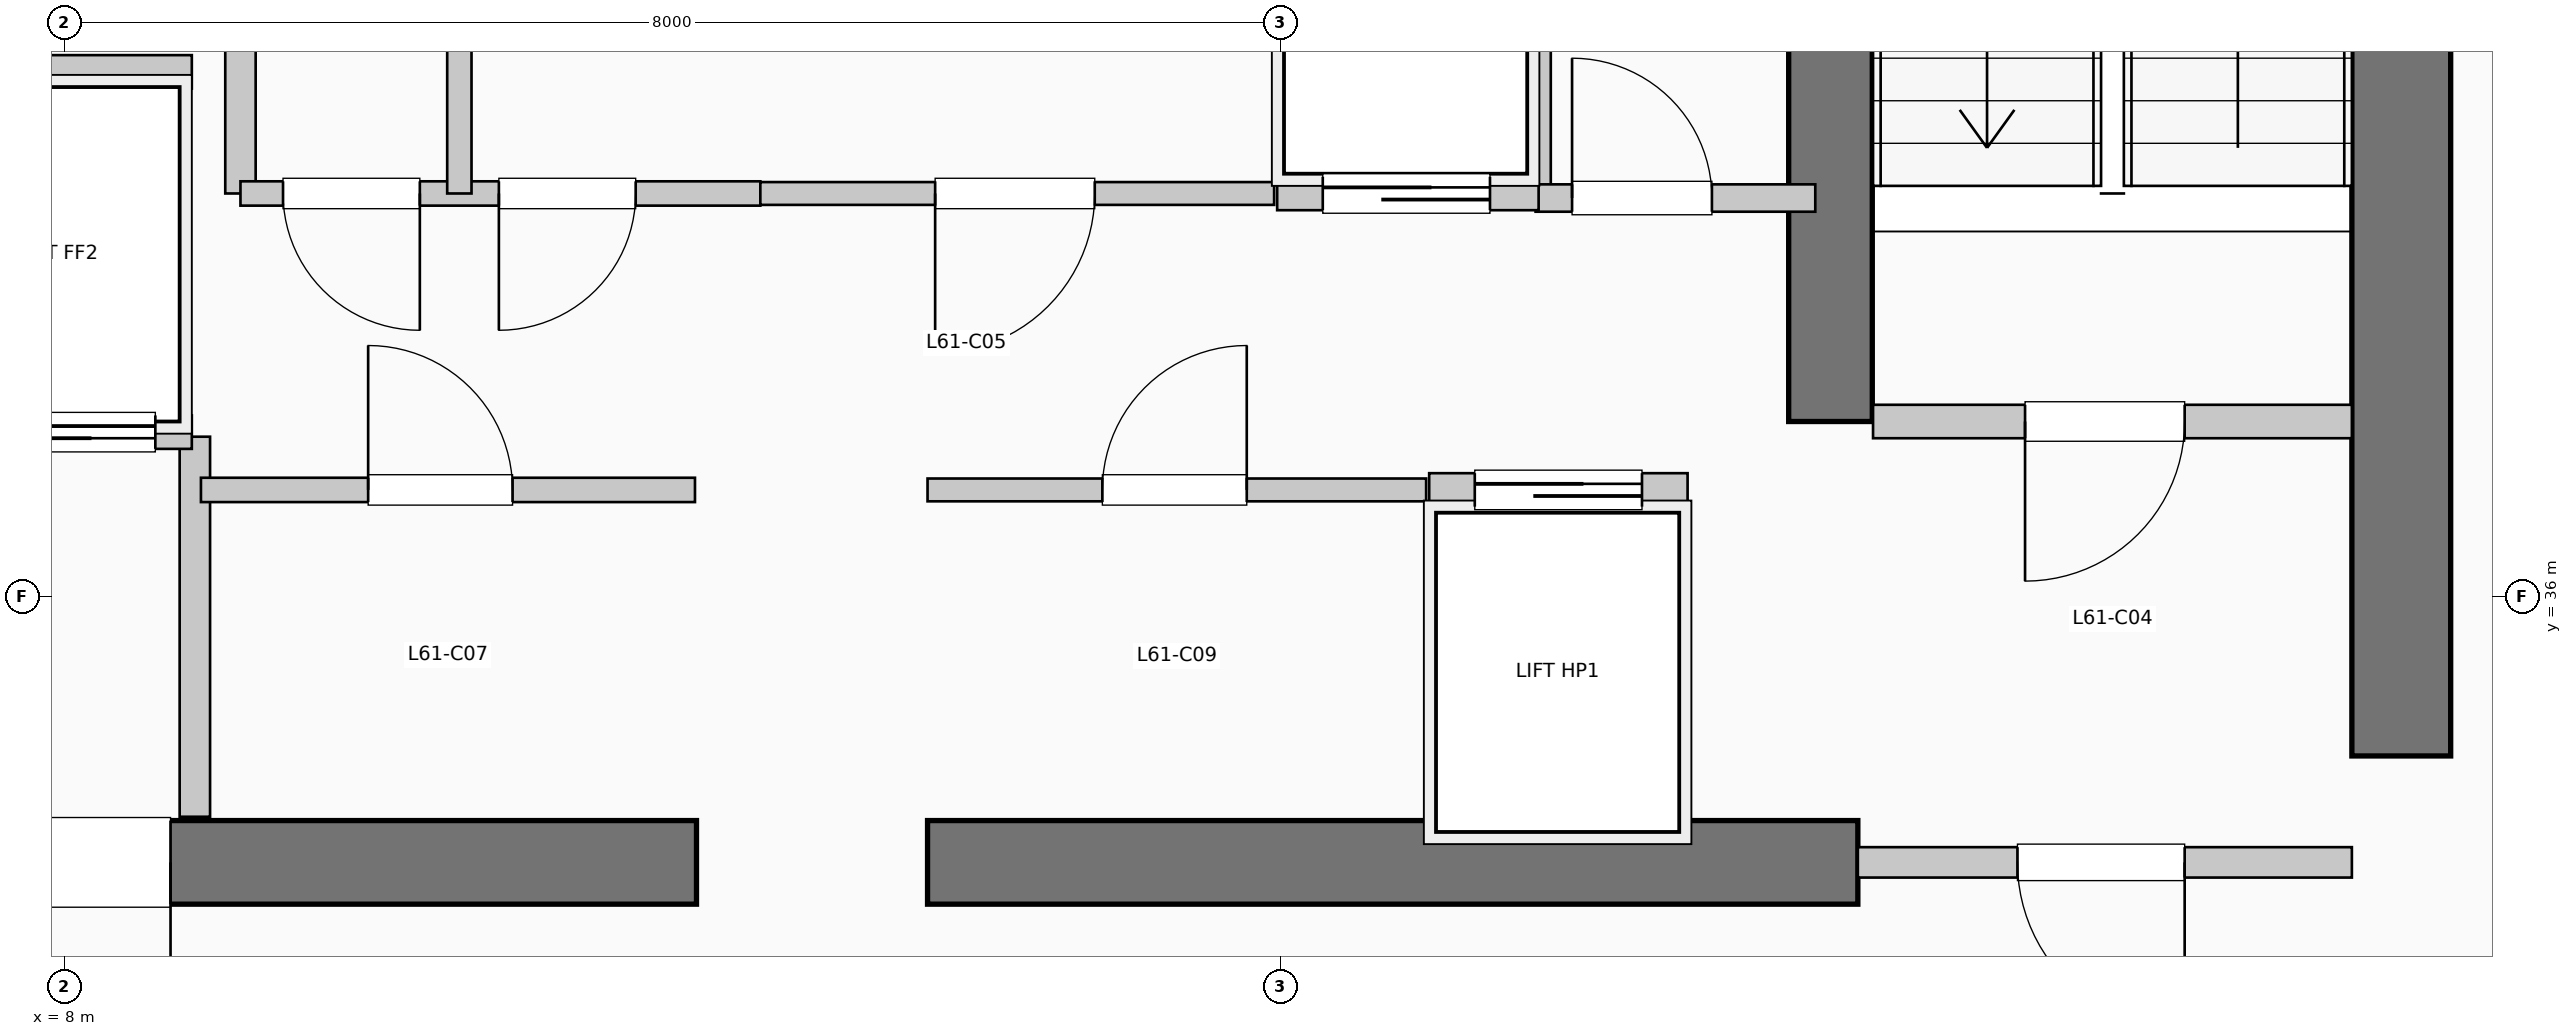
"""IFC4 building model, lengths in metres.
Left out: names, types, materials, properties, quantities, classifications, styles, units other than length and angle.
Written with IfcOpenShell. Run it as: python <this file> out.ifc"""

import sys

from ifc_helpers import new_model, si_unit, direction, frame, frame_2d, origin, place, context, subcontext, project, spatial, rectangle, extrude, element, fill, save


model = new_model("IFC4")
c1 = context("Model", 3, precision=1e-05, world=origin(), true_north=direction((0.0, 1.0)))
c2 = subcontext(c1, "Body", "Model", "MODEL_VIEW")
j1 = project(units=[si_unit("LENGTHUNIT", "METRE"), si_unit("PLANEANGLEUNIT", "RADIAN")], contexts=[c1])
p1 = place(None, origin())
s1 = spatial("IfcSite", under=j1, at=p1, CompositionType="ELEMENT")
p2 = place(p1, origin())
s2 = spatial("IfcBuilding", under=s1, at=p2, CompositionType="ELEMENT")
p3 = place(p2, frame((0.0, 0.0, 251.46)))
s3 = spatial("IfcBuildingStorey", under=s2, at=p3, CompositionType="ELEMENT", Elevation=251.46)
p4 = place(p3, frame((23.375, 34.95, 0.0), z_axis=(0.0, 0.0, 1.0), x_axis=(0.0, 1.0, 0.0)))
e1 = element("IfcWall", 1, at=p4, inside=s3, PredefinedType="SHEAR", context=c2, shape_type="SweptSolid", body=[
    extrude(rectangle(XDim=10.64, YDim=0.65, at=frame_2d((5.32, 0.0))), origin(), (0.0, 0.0, 1.0), 4.95),
])
p5 = place(p3, frame((1.45, 34.25, 0.0), z_axis=(0.0, 0.0, 1.0), x_axis=(1.0, 0.0, 0.0)))
e2 = element("IfcWall", 2, at=p5, inside=s3, PredefinedType="SHEAR", context=c2, shape_type="SweptSolid", body=[
    extrude(rectangle(XDim=10.71, YDim=0.55, at=frame_2d((5.355, 0.0))), origin(), (0.0, 0.0, 1.0), 4.95),
])
p6 = place(p5, frame((7.25, 0.0, 0.0), z_axis=(0.0, 0.0, 1.0), x_axis=(-1.0, 0.0, 0.0)))
e3 = element("IfcOpeningElement", 3, at=p6, cuts=e2, PredefinedType="OPENING", context=c2, shape_type="SweptSolid", body=[
    extrude(rectangle(XDim=1.1, YDim=2.15, at=frame_2d((0.55, 1.075))), frame((0.0, 0.285, 0.0), z_axis=(0.0, -1.0, 0.0), x_axis=(1.0, 0.0, 0.0)), (0.0, 0.0, 1.0), 0.57),
])
p7 = place(p3, frame((13.68, 34.25, 0.0), z_axis=(0.0, 0.0, 1.0), x_axis=(1.0, 0.0, 0.0)))
e4 = element("IfcWall", 4, at=p7, inside=s3, PredefinedType="SHEAR", context=c2, shape_type="SweptSolid", body=[
    extrude(rectangle(XDim=6.12, YDim=0.55, at=frame_2d((3.06, 0.0))), origin(), (0.0, 0.0, 1.0), 4.95),
])
p8 = place(p3, frame((19.62, 37.15, 0.0), z_axis=(0.0, 0.0, 1.0), x_axis=(0.0, 1.0, 0.0)))
e5 = element("IfcWall", 5, at=p8, inside=s3, PredefinedType="SHEAR", context=c2, shape_type="SweptSolid", body=[
    extrude(rectangle(XDim=7.89, YDim=0.55, at=frame_2d((3.945, 0.0))), origin(), (0.0, 0.0, 1.0), 4.95),
])
p9 = place(p3, frame((8.86, 34.55, 0.0), z_axis=(0.0, 0.0, 1.0), x_axis=(0.0, 1.0, 0.0)))
e6 = element("IfcWall", 6, at=p9, inside=s3, PredefinedType="PARTITIONING", context=c2, shape_type="SweptSolid", body=[
    extrude(rectangle(XDim=2.5, YDim=0.2, at=frame_2d((1.25, 0.0))), origin(), (0.0, 0.0, 1.0), 4.7),
])
p10 = place(p3, frame((19.9, 37.15, 0.0), z_axis=(0.0, 0.0, 1.0), x_axis=(1.0, 0.0, 0.0)))
e7 = element("IfcWall", 7, at=p10, inside=s3, PredefinedType="PARTITIONING", context=c2, shape_type="SweptSolid", body=[
    extrude(rectangle(XDim=3.15, YDim=0.22, at=frame_2d((1.575, 0.0))), origin(), (0.0, 0.0, 1.0), 4.7),
])
p11 = place(p10, frame((2.05, 0.0, 0.0), z_axis=(0.0, 0.0, 1.0), x_axis=(-1.0, 0.0, 0.0)))
e8 = element("IfcOpeningElement", 8, at=p11, cuts=e7, PredefinedType="OPENING", context=c2, shape_type="SweptSolid", body=[
    extrude(rectangle(XDim=1.05, YDim=2.15, at=frame_2d((0.525, 1.075))), frame((0.0, 0.12, 0.0), z_axis=(0.0, -1.0, 0.0), x_axis=(1.0, 0.0, 0.0)), (0.0, 0.0, 1.0), 0.24),
])
p12 = place(p3, frame((19.8, 34.25, 0.0), z_axis=(0.0, 0.0, 1.0), x_axis=(1.0, 0.0, 0.0)))
e9 = element("IfcWall", 9, at=p12, inside=s3, PredefinedType="PARTITIONING", context=c2, shape_type="SweptSolid", body=[
    extrude(rectangle(XDim=3.25, YDim=0.2, at=frame_2d((1.625, 0.0))), origin(), (0.0, 0.0, 1.0), 4.7),
])
p13 = place(p12, frame((2.15, 0.0, 0.0), z_axis=(0.0, 0.0, 1.0), x_axis=(-1.0, 0.0, 0.0)))
e10 = element("IfcOpeningElement", 10, at=p13, cuts=e9, PredefinedType="OPENING", context=c2, shape_type="SweptSolid", body=[
    extrude(rectangle(XDim=1.1, YDim=2.15, at=frame_2d((0.55, 1.075))), frame((0.0, 0.11, 0.0), z_axis=(0.0, -1.0, 0.0), x_axis=(1.0, 0.0, 0.0)), (0.0, 0.0, 1.0), 0.22),
])
p14 = place(p3, frame((5.38, 37.08, 0.0), z_axis=(0.0, 0.0, 1.0), x_axis=(1.0, 0.0, 0.0)))
e11 = element("IfcWall", 11, at=p14, inside=s3, PredefinedType="PARTITIONING", context=c2, shape_type="SweptSolid", body=[
    extrude(rectangle(XDim=3.46, YDim=0.22, at=frame_2d((1.73, 0.0))), origin(), (0.0, 0.0, 1.0), 4.7),
])
p15 = place(p14, frame((1.55, 0.0, 0.0), z_axis=(0.0, 0.0, 1.0), x_axis=(-1.0, 0.0, 0.0)))
e12 = element("IfcOpeningElement", 12, at=p15, cuts=e11, PredefinedType="OPENING", context=c2, shape_type="SweptSolid", body=[
    extrude(rectangle(XDim=1.2, YDim=2.2, at=frame_2d((0.6, 1.1))), frame((0.0, 0.12, 0.0), z_axis=(0.0, -1.0, 0.0), x_axis=(1.0, 0.0, 0.0)), (0.0, 0.0, 1.0), 0.24),
])
p16 = place(p14, frame((3.22, 0.0, 0.0), z_axis=(0.0, 0.0, 1.0), x_axis=(-1.0, 0.0, 0.0)))
e13 = element("IfcOpeningElement", 13, at=p16, cuts=e11, PredefinedType="OPENING", context=c2, shape_type="SweptSolid", body=[
    extrude(rectangle(XDim=1.2, YDim=2.2, at=frame_2d((0.6, 1.1))), frame((0.0, 0.12, 0.0), z_axis=(0.0, -1.0, 0.0), x_axis=(1.0, 0.0, 0.0)), (0.0, 0.0, 1.0), 0.24),
])
p17 = place(p3, frame((5.38, 39.45, 0.0), z_axis=(0.0, 0.0, 1.0), x_axis=(1.0, 0.0, 0.0)))
e14 = element("IfcWall", 14, at=p17, inside=s3, PredefinedType="PARTITIONING", context=c2, shape_type="SweptSolid", body=[
    extrude(rectangle(XDim=3.46, YDim=0.22, at=frame_2d((1.73, 0.0))), origin(), (0.0, 0.0, 1.0), 4.7),
])
for number, where, z_axis, x_axis in (
    (15, (9.16, 38.65, 0.0), (0.0, 0.0, 1.0), (0.0, 1.0, 0.0)),
    (16, (17.68, 38.65, 0.0), (0.0, 0.0, 1.0), (0.0, 1.0, 0.0)),
):
    element("IfcWall", number, at=place(p3, frame(where, z_axis=z_axis, x_axis=x_axis)), inside=s3, PredefinedType="PARTITIONING", context=c2, shape_type="SweptSolid", body=[
        extrude(rectangle(XDim=2.35, YDim=0.2, at=frame_2d((1.175, 0.0))), origin(), (0.0, 0.0, 1.0), 4.7),
    ])
p18 = place(p3, frame((17.68, 38.62, 0.0), z_axis=(0.0, 0.0, 1.0), x_axis=(1.0, 0.0, 0.0)))
e17 = element("IfcWall", 17, at=p18, inside=s3, PredefinedType="PARTITIONING", context=c2, shape_type="SweptSolid", body=[
    extrude(rectangle(XDim=1.84, YDim=0.18, at=frame_2d((0.92, 0.0))), origin(), (0.0, 0.0, 1.0), 4.7),
])
p19 = place(p18, frame((0.24, 0.0, 0.0)))
e18 = element("IfcOpeningElement", 18, at=p19, cuts=e17, PredefinedType="OPENING", context=c2, shape_type="SweptSolid", body=[
    extrude(rectangle(XDim=0.92, YDim=2.1, at=frame_2d((0.46, 1.05))), frame((0.0, 0.1, 0.0), z_axis=(0.0, -1.0, 0.0), x_axis=(1.0, 0.0, 0.0)), (0.0, 0.0, 1.0), 0.2),
])
p20 = place(p3, frame((8.9, 36.7, 0.0), z_axis=(0.0, 0.0, 1.0), x_axis=(1.0, 0.0, 0.0)))
e19 = element("IfcWall", 19, at=p20, inside=s3, PredefinedType="PARTITIONING", context=c2, shape_type="SweptSolid", body=[
    extrude(rectangle(XDim=3.25, YDim=0.16, at=frame_2d((1.625, 0.0))), origin(), (0.0, 0.0, 1.0), 4.7),
])
p21 = place(p20, frame((1.1, 0.0, 0.0)))
e20 = element("IfcOpeningElement", 20, at=p21, cuts=e19, PredefinedType="OPENING", context=c2, shape_type="SweptSolid", body=[
    extrude(rectangle(XDim=0.95, YDim=2.15, at=frame_2d((0.475, 1.075))), frame((0.0, 0.09, 0.0), z_axis=(0.0, -1.0, 0.0), x_axis=(1.0, 0.0, 0.0)), (0.0, 0.0, 1.0), 0.18),
])
p22 = place(p3, frame((9.16, 38.65, 0.0), z_axis=(0.0, 0.0, 1.0), x_axis=(1.0, 0.0, 0.0)))
e21 = element("IfcWall", 21, at=p22, inside=s3, PredefinedType="PARTITIONING", context=c2, shape_type="SweptSolid", body=[
    extrude(rectangle(XDim=3.42, YDim=0.16, at=frame_2d((1.71, 0.0))), origin(), (0.0, 0.0, 1.0), 4.7),
])
p23 = place(p22, frame((1.18, 0.0, 0.0), z_axis=(0.0, 0.0, 1.0), x_axis=(-1.0, 0.0, 0.0)))
e22 = element("IfcOpeningElement", 22, at=p23, cuts=e21, PredefinedType="OPENING", context=c2, shape_type="SweptSolid", body=[
    extrude(rectangle(XDim=0.9, YDim=2.15, at=frame_2d((0.45, 1.075))), frame((0.0, 0.09, 0.0), z_axis=(0.0, -1.0, 0.0), x_axis=(1.0, 0.0, 0.0)), (0.0, 0.0, 1.0), 0.18),
])
p24 = place(p22, frame((2.6, 0.0, 0.0), z_axis=(0.0, 0.0, 1.0), x_axis=(-1.0, 0.0, 0.0)))
e23 = element("IfcOpeningElement", 23, at=p24, cuts=e21, PredefinedType="OPENING", context=c2, shape_type="SweptSolid", body=[
    extrude(rectangle(XDim=0.9, YDim=2.15, at=frame_2d((0.45, 1.075))), frame((0.0, 0.09, 0.0), z_axis=(0.0, -1.0, 0.0), x_axis=(1.0, 0.0, 0.0)), (0.0, 0.0, 1.0), 0.18),
])
p25 = place(p3, frame((10.6, 38.65, 0.0), z_axis=(0.0, 0.0, 1.0), x_axis=(0.0, 1.0, 0.0)))
e24 = element("IfcWall", 24, at=p25, inside=s3, PredefinedType="PARTITIONING", context=c2, shape_type="SweptSolid", body=[
    extrude(rectangle(XDim=2.35, YDim=0.16, at=frame_2d((1.175, 0.0))), origin(), (0.0, 0.0, 1.0), 4.7),
])
p26 = place(p3, frame((13.68, 36.7, 0.0), z_axis=(0.0, 0.0, 1.0), x_axis=(1.0, 0.0, 0.0)))
e25 = element("IfcWall", 25, at=p26, inside=s3, PredefinedType="PARTITIONING", context=c2, shape_type="SweptSolid", body=[
    extrude(rectangle(XDim=3.28, YDim=0.15, at=frame_2d((1.64, 0.0))), origin(), (0.0, 0.0, 1.0), 4.7),
])
p27 = place(p26, frame((1.15, 0.0, 0.0)))
e26 = element("IfcOpeningElement", 26, at=p27, cuts=e25, PredefinedType="OPENING", context=c2, shape_type="SweptSolid", body=[
    extrude(rectangle(XDim=0.95, YDim=2.15, at=frame_2d((0.475, 1.075))), frame((0.0, 0.085, 0.0), z_axis=(0.0, -1.0, 0.0), x_axis=(1.0, 0.0, 0.0)), (0.0, 0.0, 1.0), 0.17),
])
p28 = place(p3, frame((12.58, 38.65, 0.0), z_axis=(0.0, 0.0, 1.0), x_axis=(1.0, 0.0, 0.0)))
e27 = element("IfcWall", 27, at=p28, inside=s3, PredefinedType="PARTITIONING", context=c2, shape_type="SweptSolid", body=[
    extrude(rectangle(XDim=3.38, YDim=0.15, at=frame_2d((1.69, 0.0))), origin(), (0.0, 0.0, 1.0), 4.7),
])
p29 = place(p28, frame((2.2, 0.0, 0.0), z_axis=(0.0, 0.0, 1.0), x_axis=(-1.0, 0.0, 0.0)))
e28 = element("IfcOpeningElement", 28, at=p29, cuts=e27, PredefinedType="OPENING", context=c2, shape_type="SweptSolid", body=[
    extrude(rectangle(XDim=1.05, YDim=2.15, at=frame_2d((0.525, 1.075))), frame((0.0, 0.085, 0.0), z_axis=(0.0, -1.0, 0.0), x_axis=(1.0, 0.0, 0.0)), (0.0, 0.0, 1.0), 0.17),
])
p30 = place(p3, frame((16.98, 36.7, 0.0), z_axis=(0.0, 0.0, 1.0), x_axis=(1.0, 0.0, 0.0)))
e29 = element("IfcWall", 29, at=p30, inside=s3, PredefinedType="PARTITIONING", context=c2, shape_type="SweptSolid", body=[
    extrude(rectangle(XDim=1.7, YDim=0.22, at=frame_2d((0.85, 0.0))), origin(), (0.0, 0.0, 1.0), 4.7),
])
p31 = place(p30, frame((0.3, 0.0, 0.0)))
e30 = element("IfcOpeningElement", 30, at=p31, cuts=e29, PredefinedType="OPENING", context=c2, shape_type="SweptSolid", body=[
    extrude(rectangle(XDim=1.1, YDim=2.2, at=frame_2d((0.55, 1.1))), frame((0.0, 0.12, 0.0), z_axis=(0.0, -1.0, 0.0), x_axis=(1.0, 0.0, 0.0)), (0.0, 0.0, 1.0), 0.24),
])
p32 = place(p3, frame((15.98, 38.65, 0.0), z_axis=(0.0, 0.0, 1.0), x_axis=(1.0, 0.0, 0.0)))
e31 = element("IfcWall", 31, at=p32, inside=s3, PredefinedType="PARTITIONING", context=c2, shape_type="SweptSolid", body=[
    extrude(rectangle(XDim=1.72, YDim=0.22, at=frame_2d((0.86, 0.0))), origin(), (0.0, 0.0, 1.0), 4.7),
])
p33 = place(p32, frame((0.3, 0.0, 0.0)))
e32 = element("IfcOpeningElement", 32, at=p33, cuts=e31, PredefinedType="OPENING", context=c2, shape_type="SweptSolid", body=[
    extrude(rectangle(XDim=1.1, YDim=2.2, at=frame_2d((0.55, 1.1))), frame((0.0, 0.12, 0.0), z_axis=(0.0, -1.0, 0.0), x_axis=(1.0, 0.0, 0.0)), (0.0, 0.0, 1.0), 0.24),
])
p34 = place(p6, origin())
e33 = element("IfcDoor", 33, at=p34, inside=s3, OperationType="SINGLE_SWING_RIGHT", PredefinedType="DOOR", context=c2, shape_type="SweptSolid", body=[
    extrude(rectangle(XDim=1.1, YDim=2.15, at=frame_2d((0.55, 1.075))), frame((0.0, 0.025, 0.0), z_axis=(0.0, -1.0, 0.0), x_axis=(1.0, 0.0, 0.0)), (0.0, 0.0, 1.0), 0.05),
])
fill(e3, e33)
p35 = place(p11, origin())
e34 = element("IfcDoor", 34, at=p35, inside=s3, OperationType="SINGLE_SWING_LEFT", PredefinedType="DOOR", context=c2, shape_type="SweptSolid", body=[
    extrude(rectangle(XDim=1.05, YDim=2.15, at=frame_2d((0.525, 1.075))), frame((0.0, 0.025, 0.0), z_axis=(0.0, -1.0, 0.0), x_axis=(1.0, 0.0, 0.0)), (0.0, 0.0, 1.0), 0.05),
])
fill(e8, e34)
p36 = place(p13, origin())
e35 = element("IfcDoor", 35, at=p36, inside=s3, OperationType="SINGLE_SWING_RIGHT", PredefinedType="DOOR", context=c2, shape_type="SweptSolid", body=[
    extrude(rectangle(XDim=1.1, YDim=2.15, at=frame_2d((0.55, 1.075))), frame((0.0, 0.025, 0.0), z_axis=(0.0, -1.0, 0.0), x_axis=(1.0, 0.0, 0.0)), (0.0, 0.0, 1.0), 0.05),
])
fill(e10, e35)
p37 = place(p16, origin())
e36 = element("IfcDoor", 36, at=p37, inside=s3, OperationType="SLIDING_TO_RIGHT", PredefinedType="DOOR", context=c2, shape_type="SweptSolid", body=[
    extrude(rectangle(XDim=1.2, YDim=2.2, at=frame_2d((0.6, 1.1))), frame((0.0, 0.025, 0.0), z_axis=(0.0, -1.0, 0.0), x_axis=(1.0, 0.0, 0.0)), (0.0, 0.0, 1.0), 0.05),
])
fill(e13, e36)
p38 = place(p19, origin())
e37 = element("IfcDoor", 37, at=p38, inside=s3, OperationType="SINGLE_SWING_LEFT", PredefinedType="DOOR", context=c2, shape_type="SweptSolid", body=[
    extrude(rectangle(XDim=0.92, YDim=2.1, at=frame_2d((0.46, 1.05))), frame((0.0, 0.025, 0.0), z_axis=(0.0, -1.0, 0.0), x_axis=(1.0, 0.0, 0.0)), (0.0, 0.0, 1.0), 0.05),
])
fill(e18, e37)
p39 = place(p21, origin())
e38 = element("IfcDoor", 38, at=p39, inside=s3, OperationType="SINGLE_SWING_LEFT", PredefinedType="DOOR", context=c2, shape_type="SweptSolid", body=[
    extrude(rectangle(XDim=0.95, YDim=2.15, at=frame_2d((0.475, 1.075))), frame((0.0, 0.025, 0.0), z_axis=(0.0, -1.0, 0.0), x_axis=(1.0, 0.0, 0.0)), (0.0, 0.0, 1.0), 0.05),
])
fill(e20, e38)
p40 = place(p23, origin())
e39 = element("IfcDoor", 39, at=p40, inside=s3, OperationType="SINGLE_SWING_RIGHT", PredefinedType="DOOR", context=c2, shape_type="SweptSolid", body=[
    extrude(rectangle(XDim=0.9, YDim=2.15, at=frame_2d((0.45, 1.075))), frame((0.0, 0.025, 0.0), z_axis=(0.0, -1.0, 0.0), x_axis=(1.0, 0.0, 0.0)), (0.0, 0.0, 1.0), 0.05),
])
fill(e22, e39)
p41 = place(p24, origin())
e40 = element("IfcDoor", 40, at=p41, inside=s3, OperationType="SINGLE_SWING_LEFT", PredefinedType="DOOR", context=c2, shape_type="SweptSolid", body=[
    extrude(rectangle(XDim=0.9, YDim=2.15, at=frame_2d((0.45, 1.075))), frame((0.0, 0.025, 0.0), z_axis=(0.0, -1.0, 0.0), x_axis=(1.0, 0.0, 0.0)), (0.0, 0.0, 1.0), 0.05),
])
fill(e23, e40)
p42 = place(p27, origin())
e41 = element("IfcDoor", 41, at=p42, inside=s3, OperationType="SINGLE_SWING_RIGHT", PredefinedType="DOOR", context=c2, shape_type="SweptSolid", body=[
    extrude(rectangle(XDim=0.95, YDim=2.15, at=frame_2d((0.475, 1.075))), frame((0.0, 0.025, 0.0), z_axis=(0.0, -1.0, 0.0), x_axis=(1.0, 0.0, 0.0)), (0.0, 0.0, 1.0), 0.05),
])
fill(e26, e41)
p43 = place(p29, origin())
e42 = element("IfcDoor", 42, at=p43, inside=s3, OperationType="SINGLE_SWING_LEFT", PredefinedType="DOOR", context=c2, shape_type="SweptSolid", body=[
    extrude(rectangle(XDim=1.05, YDim=2.15, at=frame_2d((0.525, 1.075))), frame((0.0, 0.025, 0.0), z_axis=(0.0, -1.0, 0.0), x_axis=(1.0, 0.0, 0.0)), (0.0, 0.0, 1.0), 0.05),
])
fill(e28, e42)
p44 = place(p31, origin())
e43 = element("IfcDoor", 43, at=p44, inside=s3, OperationType="SLIDING_TO_LEFT", PredefinedType="DOOR", context=c2, shape_type="SweptSolid", body=[
    extrude(rectangle(XDim=1.1, YDim=2.2, at=frame_2d((0.55, 1.1))), frame((0.0, 0.025, 0.0), z_axis=(0.0, -1.0, 0.0), x_axis=(1.0, 0.0, 0.0)), (0.0, 0.0, 1.0), 0.05),
])
fill(e30, e43)
p45 = place(p33, origin())
e44 = element("IfcDoor", 44, at=p45, inside=s3, OperationType="SLIDING_TO_LEFT", PredefinedType="DOOR", context=c2, shape_type="SweptSolid", body=[
    extrude(rectangle(XDim=1.1, YDim=2.2, at=frame_2d((0.55, 1.1))), frame((0.0, 0.025, 0.0), z_axis=(0.0, -1.0, 0.0), x_axis=(1.0, 0.0, 0.0)), (0.0, 0.0, 1.0), 0.05),
])
fill(e32, e44)
save(model, sys.argv[1])
